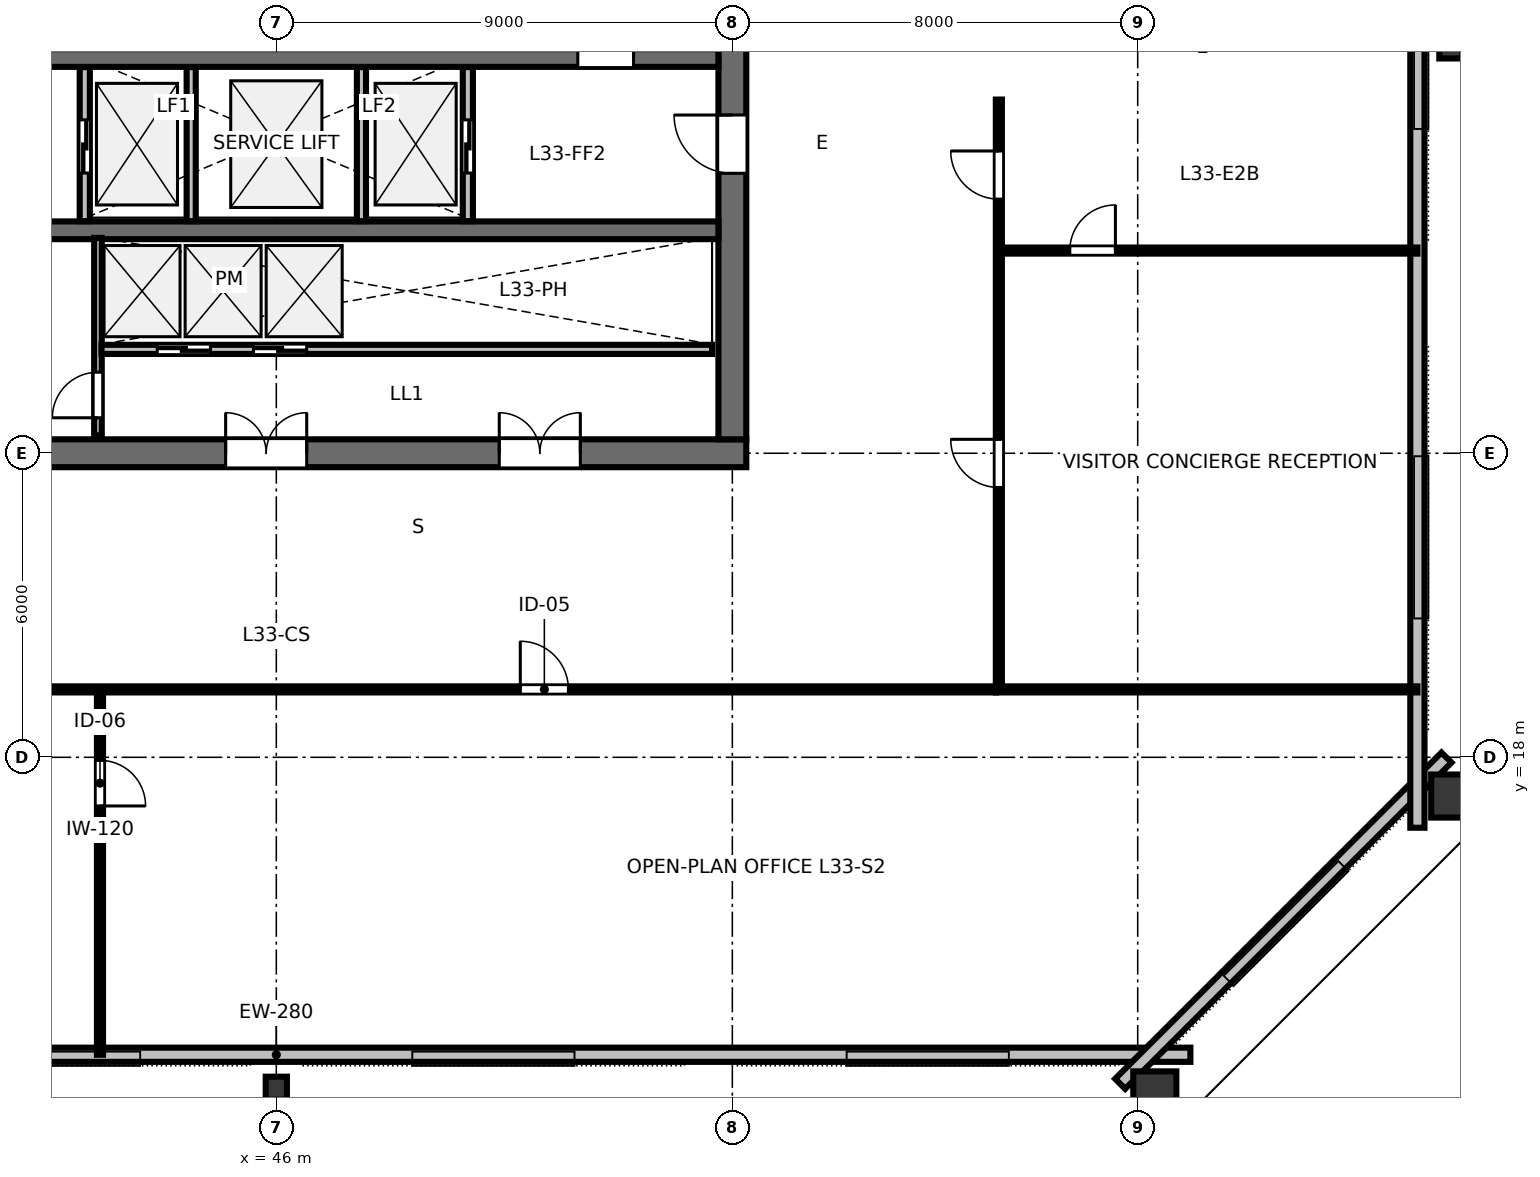
"""IFC4 building model, lengths in metres.
Left out: names, types, materials, properties, quantities, classifications, styles, units other than length and angle.
Written with IfcOpenShell. Run it as: python <this file> out.ifc"""

import sys

from ifc_helpers import new_model, si_unit, direction, frame, frame_2d, origin, origin_2d, place, context, subcontext, project, spatial, rectangle, hollow_rectangle, i_section, extrude, element, fill, save


model = new_model("IFC4")
c1 = context("Model", 3, precision=1e-05, world=origin(), true_north=direction((0.0, 1.0)))
c2 = subcontext(c1, "Body", "Model", "MODEL_VIEW")
j1 = project(units=[si_unit("LENGTHUNIT", "METRE"), si_unit("PLANEANGLEUNIT", "RADIAN")], contexts=[c1])
p1 = place(None, origin())
s1 = spatial("IfcSite", under=j1, at=p1, CompositionType="ELEMENT")
p2 = place(p1, origin())
s2 = spatial("IfcBuilding", under=s1, at=p2, CompositionType="ELEMENT")
p3 = place(p2, frame((0.0, 0.0, 127.6)))
s3 = spatial("IfcBuildingStorey", under=s2, at=p3, CompositionType="ELEMENT", Elevation=127.6)
p4 = place(p3, frame((36.725, 24.0, 0.0), z_axis=(0.0, 0.0, 1.0), x_axis=(1.0, 0.0, 0.0)))
e1 = element("IfcWall", 1, at=p4, inside=s3, PredefinedType="SHEAR", context=c2, shape_type="SweptSolid", body=[
    extrude(rectangle(XDim=18.55, YDim=0.55, at=frame_2d((9.275, 0.0))), origin(), (0.0, 0.0, 1.0), 3.36),
])
p5 = place(p4, frame((8.275, 0.0, 0.0)))
e2 = element("IfcOpeningElement", 2, at=p5, cuts=e1, PredefinedType="OPENING", context=c2, shape_type="SweptSolid", body=[
    extrude(rectangle(XDim=1.6, YDim=2.15, at=frame_2d((0.8, 1.075))), frame((0.0, 0.285, 0.0), z_axis=(0.0, -1.0, 0.0), x_axis=(1.0, 0.0, 0.0)), (0.0, 0.0, 1.0), 0.57),
])
p6 = place(p4, frame((13.675, 0.0, 0.0)))
e3 = element("IfcOpeningElement", 3, at=p6, cuts=e1, PredefinedType="OPENING", context=c2, shape_type="SweptSolid", body=[
    extrude(rectangle(XDim=1.6, YDim=2.15, at=frame_2d((0.8, 1.075))), frame((0.0, 0.285, 0.0), z_axis=(0.0, -1.0, 0.0), x_axis=(1.0, 0.0, 0.0)), (0.0, 0.0, 1.0), 0.57),
])
p7 = place(p3, frame((55.0, 24.275, 0.0), z_axis=(0.0, 0.0, 1.0), x_axis=(0.0, 1.0, 0.0)))
e4 = element("IfcWall", 4, at=p7, inside=s3, PredefinedType="SHEAR", context=c2, shape_type="SweptSolid", body=[
    extrude(rectangle(XDim=15.45, YDim=0.55, at=frame_2d((7.725, 0.0))), origin(), (0.0, 0.0, 1.0), 3.36),
])
p8 = place(p7, frame((5.25, 0.0, 0.0)))
e5 = element("IfcOpeningElement", 5, at=p8, cuts=e4, PredefinedType="OPENING", context=c2, shape_type="SweptSolid", body=[
    extrude(rectangle(XDim=1.15, YDim=2.15, at=frame_2d((0.575, 1.075))), frame((0.0, 0.285, 0.0), z_axis=(0.0, -1.0, 0.0), x_axis=(1.0, 0.0, 0.0)), (0.0, 0.0, 1.0), 0.57),
])
p9 = place(p3, frame((37.275, 31.8, 0.0), z_axis=(0.0, 0.0, 1.0), x_axis=(1.0, 0.0, 0.0)))
e6 = element("IfcWall", 6, at=p9, inside=s3, PredefinedType="SHEAR", context=c2, shape_type="SweptSolid", body=[
    extrude(rectangle(XDim=17.45, YDim=0.35, at=frame_2d((8.725, 0.0))), origin(), (0.0, 0.0, 1.0), 3.36),
])
p10 = place(p9, frame((0.775, 0.0, 0.0)))
e7 = element("IfcOpeningElement", 7, at=p10, cuts=e6, PredefinedType="OPENING", context=c2, shape_type="SweptSolid", body=[
    extrude(rectangle(XDim=1.1, YDim=2.15, at=frame_2d((0.55, 1.075))), frame((0.0, 0.185, 0.0), z_axis=(0.0, -1.0, 0.0), x_axis=(1.0, 0.0, 0.0)), (0.0, 0.0, 1.0), 0.37),
])
p11 = place(p9, frame((14.675, 0.0, 0.0)))
e8 = element("IfcOpeningElement", 8, at=p11, cuts=e6, PredefinedType="OPENING", context=c2, shape_type="SweptSolid", body=[
    extrude(rectangle(XDim=1.1, YDim=2.15, at=frame_2d((0.55, 1.075))), frame((0.0, 0.185, 0.0), z_axis=(0.0, -1.0, 0.0), x_axis=(1.0, 0.0, 0.0)), (0.0, 0.0, 1.0), 0.37),
])
p12 = place(p3, frame((37.275, 28.4, 0.0), z_axis=(0.0, 0.0, 1.0), x_axis=(1.0, 0.0, 0.0)))
e9 = element("IfcWall", 9, at=p12, inside=s3, PredefinedType="SHEAR", context=c2, shape_type="SweptSolid", body=[
    extrude(rectangle(XDim=17.45, YDim=0.35, at=frame_2d((8.725, 0.0))), origin(), (0.0, 0.0, 1.0), 3.36),
])
p13 = place(p3, frame((46.0, 11.47, 0.0), z_axis=(0.0, 0.0, 1.0), x_axis=(1.0, 0.0, 0.0)))
e10 = element("IfcColumn", 10, at=p13, inside=s3, PredefinedType="COLUMN", context=c2, shape_type="SweptSolid", body=[
    extrude(i_section(OverallWidth=0.418, OverallDepth=0.455, WebThickness=0.042, FlangeThickness=0.068, FilletRadius=0.025, at=origin_2d()), origin(), (0.0, 0.0, 1.0), 3.358),
])
for number, where, z_axis, x_axis in (
    (11, (63.338, 11.302, 0.0), (0.0, 0.0, 1.0), (1.0, 0.0, 0.0)),
    (12, (69.292, 17.236, 0.0), (0.0, 0.0, 1.0), (0.0, 1.0, 0.0)),
):
    element("IfcColumn", number, at=place(p3, frame(where, z_axis=z_axis, x_axis=x_axis)), inside=s3, PredefinedType="COLUMN", context=c2, shape_type="SweptSolid", body=[
        extrude(hollow_rectangle(XDim=0.85, YDim=1.0, WallThickness=0.05, at=origin_2d()), origin(), (0.0, 0.0, 1.0), 3.358),
    ])
p14 = place(p3, frame((69.18, 32.0, 0.0), z_axis=(0.0, 0.0, 1.0), x_axis=(0.0, 1.0, 0.0)))
e13 = element("IfcColumn", 13, at=p14, inside=s3, PredefinedType="COLUMN", context=c2, shape_type="SweptSolid", body=[
    extrude(i_section(OverallWidth=0.418, OverallDepth=0.455, WebThickness=0.042, FlangeThickness=0.068, FilletRadius=0.025, at=origin_2d()), origin(), (0.0, 0.0, 1.0), 3.358),
])
p15 = place(p3, frame((27.96, 12.13, 0.0), z_axis=(0.0, 0.0, 1.0), x_axis=(1.0, 0.0, 0.0)))
e14 = element("IfcWall", 14, at=p15, inside=s3, PredefinedType="STANDARD", context=c2, shape_type="SweptSolid", body=[
    extrude(rectangle(XDim=36.08, YDim=0.28, at=frame_2d((18.04, 0.0))), origin(), (0.0, 0.0, 1.0), 3.36),
])
p16 = place(p3, frame((62.655, 11.556, 0.0), z_axis=(0.0, 0.0, 1.0), x_axis=(0.707106781187, 0.707106781187, 0.0)))
e15 = element("IfcWall", 15, at=p16, inside=s3, PredefinedType="STANDARD", context=c2, shape_type="SweptSolid", body=[
    extrude(rectangle(XDim=9.107, YDim=0.28, at=frame_2d((4.553, 0.0))), origin(), (0.0, 0.0, 1.0), 3.36),
])
p17 = place(p3, frame((68.52, 16.61, 0.0), z_axis=(0.0, 0.0, 1.0), x_axis=(0.0, 1.0, 0.0)))
e16 = element("IfcWall", 16, at=p17, inside=s3, PredefinedType="STANDARD", context=c2, shape_type="SweptSolid", body=[
    extrude(rectangle(XDim=30.78, YDim=0.28, at=frame_2d((15.39, 0.0))), origin(), (0.0, 0.0, 1.0), 3.36),
])
p18 = place(p3, frame((42.22, 28.58, 0.0), z_axis=(0.0, 0.0, 1.0), x_axis=(0.0, 1.0, 0.0)))
e17 = element("IfcWall", 17, at=p18, inside=s3, PredefinedType="PARTITIONING", context=c2, shape_type="SweptSolid", body=[
    extrude(rectangle(XDim=3.04, YDim=0.2, at=frame_2d((1.52, 0.0))), origin(), (0.0, 0.0, 1.0), 3.36),
])
p19 = place(p18, frame((0.95, 0.0, 0.0)))
e18 = element("IfcOpeningElement", 18, at=p19, cuts=e17, PredefinedType="OPENING", context=c2, shape_type="SweptSolid", body=[
    extrude(rectangle(XDim=1.05, YDim=2.15, at=frame_2d((0.525, 1.075))), frame((0.0, 0.11, 0.0), z_axis=(0.0, -1.0, 0.0), x_axis=(1.0, 0.0, 0.0)), (0.0, 0.0, 1.0), 0.22),
])
p20 = place(p3, frame((49.78, 28.58, 0.0), z_axis=(0.0, 0.0, 1.0), x_axis=(0.0, 1.0, 0.0)))
e19 = element("IfcWall", 19, at=p20, inside=s3, PredefinedType="PARTITIONING", context=c2, shape_type="SweptSolid", body=[
    extrude(rectangle(XDim=3.04, YDim=0.2, at=frame_2d((1.52, 0.0))), origin(), (0.0, 0.0, 1.0), 3.36),
])
p21 = place(p20, frame((0.95, 0.0, 0.0)))
e20 = element("IfcOpeningElement", 20, at=p21, cuts=e19, PredefinedType="OPENING", context=c2, shape_type="SweptSolid", body=[
    extrude(rectangle(XDim=1.05, YDim=2.15, at=frame_2d((0.525, 1.075))), frame((0.0, 0.11, 0.0), z_axis=(0.0, -1.0, 0.0), x_axis=(1.0, 0.0, 0.0)), (0.0, 0.0, 1.0), 0.22),
])
for number, where, z_axis, x_axis in (
    (21, (44.32, 28.58, 0.0), (0.0, 0.0, 1.0), (0.0, 1.0, 0.0)),
    (22, (47.68, 28.58, 0.0), (0.0, 0.0, 1.0), (0.0, 1.0, 0.0)),
):
    element("IfcWall", number, at=place(p3, frame(where, z_axis=z_axis, x_axis=x_axis)), inside=s3, PredefinedType="PARTITIONING", context=c2, shape_type="SweptSolid", body=[
        extrude(rectangle(XDim=3.04, YDim=0.18, at=frame_2d((1.52, 0.0))), origin(), (0.0, 0.0, 1.0), 3.36),
    ])
p22 = place(p3, frame((42.48, 24.35, 0.0), z_axis=(0.0, 0.0, 1.0), x_axis=(0.0, 1.0, 0.0)))
e23 = element("IfcWall", 23, at=p22, inside=s3, PredefinedType="PARTITIONING", context=c2, shape_type="SweptSolid", body=[
    extrude(rectangle(XDim=3.9, YDim=0.15, at=frame_2d((1.95, 0.0))), origin(), (0.0, 0.0, 1.0), 3.36),
])
p23 = place(p22, frame((0.35, 0.0, 0.0)))
e24 = element("IfcOpeningElement", 24, at=p23, cuts=e23, PredefinedType="OPENING", context=c2, shape_type="SweptSolid", body=[
    extrude(rectangle(XDim=0.9, YDim=2.15, at=frame_2d((0.45, 1.075))), frame((0.0, 0.085, 0.0), z_axis=(0.0, -1.0, 0.0), x_axis=(1.0, 0.0, 0.0)), (0.0, 0.0, 1.0), 0.17),
])
p24 = place(p3, frame((42.55, 26.05, 0.0), z_axis=(0.0, 0.0, 1.0), x_axis=(1.0, 0.0, 0.0)))
e25 = element("IfcWall", 25, at=p24, inside=s3, PredefinedType="PARTITIONING", context=c2, shape_type="SweptSolid", body=[
    extrude(rectangle(XDim=12.05, YDim=0.18, at=frame_2d((6.025, 0.0))), origin(), (0.0, 0.0, 1.0), 3.36),
])
p25 = place(p24, frame((1.1, 0.0, 0.0)))
e26 = element("IfcOpeningElement", 26, at=p25, cuts=e25, PredefinedType="OPENING", context=c2, shape_type="SweptSolid", body=[
    extrude(rectangle(XDim=1.05, YDim=2.15, at=frame_2d((0.525, 1.075))), frame((0.0, 0.1, 0.0), z_axis=(0.0, -1.0, 0.0), x_axis=(1.0, 0.0, 0.0)), (0.0, 0.0, 1.0), 0.2),
])
p26 = place(p24, frame((3.0, 0.0, 0.0)))
e27 = element("IfcOpeningElement", 27, at=p26, cuts=e25, PredefinedType="OPENING", context=c2, shape_type="SweptSolid", body=[
    extrude(rectangle(XDim=1.05, YDim=2.15, at=frame_2d((0.525, 1.075))), frame((0.0, 0.1, 0.0), z_axis=(0.0, -1.0, 0.0), x_axis=(1.0, 0.0, 0.0)), (0.0, 0.0, 1.0), 0.2),
])
p27 = place(p3, frame((42.52, 19.34, 0.0), z_axis=(0.0, 0.0, 1.0), x_axis=(0.0, -1.0, 0.0)))
e28 = element("IfcWall", 28, at=p27, inside=s3, PredefinedType="PARTITIONING", context=c2, shape_type="SweptSolid", body=[
    extrude(rectangle(XDim=7.21, YDim=0.12, at=frame_2d((3.605, 0.0))), origin(), (0.0, 0.0, 1.0), 2.64),
])
p28 = place(p27, frame((1.4, 0.0, 0.0)))
e29 = element("IfcOpeningElement", 29, at=p28, cuts=e28, PredefinedType="OPENING", context=c2, shape_type="SweptSolid", body=[
    extrude(rectangle(XDim=0.9, YDim=2.15, at=frame_2d((0.45, 1.075))), frame((0.0, 0.07, 0.0), z_axis=(0.0, -1.0, 0.0), x_axis=(1.0, 0.0, 0.0)), (0.0, 0.0, 1.0), 0.14),
])
p29 = place(p3, frame((31.8, 19.34, 0.0), z_axis=(0.0, 0.0, 1.0), x_axis=(1.0, 0.0, 0.0)))
e30 = element("IfcWall", 30, at=p29, inside=s3, PredefinedType="PARTITIONING", context=c2, shape_type="SweptSolid", body=[
    extrude(rectangle(XDim=28.4, YDim=0.12, at=frame_2d((14.2, 0.0))), origin(), (0.0, 0.0, 1.0), 2.64),
])
p30 = place(p29, frame((4.955, 0.0, 0.0)))
e31 = element("IfcOpeningElement", 31, at=p30, cuts=e30, PredefinedType="OPENING", context=c2, shape_type="SweptSolid", body=[
    extrude(rectangle(XDim=0.95, YDim=2.15, at=frame_2d((0.475, 1.075))), frame((0.0, 0.07, 0.0), z_axis=(0.0, -1.0, 0.0), x_axis=(1.0, 0.0, 0.0)), (0.0, 0.0, 1.0), 0.14),
])
p31 = place(p29, frame((19.015, 0.0, 0.0)))
e32 = element("IfcOpeningElement", 32, at=p31, cuts=e30, PredefinedType="OPENING", context=c2, shape_type="SweptSolid", body=[
    extrude(rectangle(XDim=0.95, YDim=2.15, at=frame_2d((0.475, 1.075))), frame((0.0, 0.07, 0.0), z_axis=(0.0, -1.0, 0.0), x_axis=(1.0, 0.0, 0.0)), (0.0, 0.0, 1.0), 0.14),
])
p32 = place(p3, frame((60.26, 28.0, 0.0), z_axis=(0.0, 0.0, 1.0), x_axis=(1.0, 0.0, 0.0)))
e33 = element("IfcWall", 33, at=p32, inside=s3, PredefinedType="PARTITIONING", context=c2, shape_type="SweptSolid", body=[
    extrude(rectangle(XDim=8.26, YDim=0.12, at=frame_2d((4.13, 0.0))), origin(), (0.0, 0.0, 1.0), 2.64),
])
p33 = place(p32, frame((1.4, 0.0, 0.0)))
e34 = element("IfcOpeningElement", 34, at=p33, cuts=e33, PredefinedType="OPENING", context=c2, shape_type="SweptSolid", body=[
    extrude(rectangle(XDim=0.9, YDim=2.15, at=frame_2d((0.45, 1.075))), frame((0.0, 0.07, 0.0), z_axis=(0.0, -1.0, 0.0), x_axis=(1.0, 0.0, 0.0)), (0.0, 0.0, 1.0), 0.14),
])
p34 = place(p3, frame((60.26, 19.4, 0.0), z_axis=(0.0, 0.0, 1.0), x_axis=(0.0, 1.0, 0.0)))
e35 = element("IfcWall", 35, at=p34, inside=s3, PredefinedType="PARTITIONING", context=c2, shape_type="SweptSolid", body=[
    extrude(rectangle(XDim=11.58, YDim=0.12, at=frame_2d((5.79, 0.0))), origin(), (0.0, 0.0, 1.0), 2.64),
])
p35 = place(p34, frame((3.925, 0.0, 0.0)))
e36 = element("IfcOpeningElement", 36, at=p35, cuts=e35, PredefinedType="OPENING", context=c2, shape_type="SweptSolid", body=[
    extrude(rectangle(XDim=0.95, YDim=2.15, at=frame_2d((0.475, 1.075))), frame((0.0, 0.07, 0.0), z_axis=(0.0, -1.0, 0.0), x_axis=(1.0, 0.0, 0.0)), (0.0, 0.0, 1.0), 0.14),
])
p36 = place(p34, frame((9.615, 0.0, 0.0)))
e37 = element("IfcOpeningElement", 37, at=p36, cuts=e35, PredefinedType="OPENING", context=c2, shape_type="SweptSolid", body=[
    extrude(rectangle(XDim=0.95, YDim=2.15, at=frame_2d((0.475, 1.075))), frame((0.0, 0.07, 0.0), z_axis=(0.0, -1.0, 0.0), x_axis=(1.0, 0.0, 0.0)), (0.0, 0.0, 1.0), 0.14),
])
p37 = place(p3, frame((60.2, 19.34, 0.0), z_axis=(0.0, 0.0, 1.0), x_axis=(1.0, 0.0, 0.0)))
e38 = element("IfcWall", 38, at=p37, inside=s3, PredefinedType="PARTITIONING", context=c2, shape_type="SweptSolid", body=[
    extrude(rectangle(XDim=8.32, YDim=0.12, at=frame_2d((4.16, 0.0))), origin(), (0.0, 0.0, 1.0), 2.64),
])
p38 = place(p11, origin())
e39 = element("IfcDoor", 39, at=p38, inside=s3, OperationType="SINGLE_SWING_RIGHT", PredefinedType="DOOR", context=c2, shape_type="SweptSolid", body=[
    extrude(rectangle(XDim=1.1, YDim=2.15, at=frame_2d((0.55, 1.075))), frame((0.0, 0.025, 0.0), z_axis=(0.0, -1.0, 0.0), x_axis=(1.0, 0.0, 0.0)), (0.0, 0.0, 1.0), 0.05),
])
fill(e8, e39)
p39 = place(p8, origin())
e40 = element("IfcDoor", 40, at=p39, inside=s3, OperationType="SINGLE_SWING_RIGHT", PredefinedType="DOOR", context=c2, shape_type="SweptSolid", body=[
    extrude(rectangle(XDim=1.15, YDim=2.15, at=frame_2d((0.575, 1.075))), frame((0.0, 0.025, 0.0), z_axis=(0.0, -1.0, 0.0), x_axis=(1.0, 0.0, 0.0)), (0.0, 0.0, 1.0), 0.05),
])
fill(e5, e40)
p40 = place(p5, origin())
e41 = element("IfcDoor", 41, at=p40, inside=s3, OperationType="DOUBLE_DOOR_SINGLE_SWING", PredefinedType="DOOR", context=c2, shape_type="SweptSolid", body=[
    extrude(rectangle(XDim=1.6, YDim=2.15, at=frame_2d((0.8, 1.075))), frame((0.0, 0.025, 0.0), z_axis=(0.0, -1.0, 0.0), x_axis=(1.0, 0.0, 0.0)), (0.0, 0.0, 1.0), 0.05),
])
fill(e2, e41)
p41 = place(p6, origin())
e42 = element("IfcDoor", 42, at=p41, inside=s3, OperationType="DOUBLE_DOOR_SINGLE_SWING", PredefinedType="DOOR", context=c2, shape_type="SweptSolid", body=[
    extrude(rectangle(XDim=1.6, YDim=2.15, at=frame_2d((0.8, 1.075))), frame((0.0, 0.025, 0.0), z_axis=(0.0, -1.0, 0.0), x_axis=(1.0, 0.0, 0.0)), (0.0, 0.0, 1.0), 0.05),
])
fill(e3, e42)
p42 = place(p19, origin())
e43 = element("IfcDoor", 43, at=p42, inside=s3, OperationType="SLIDING_TO_LEFT", PredefinedType="DOOR", context=c2, shape_type="SweptSolid", body=[
    extrude(rectangle(XDim=1.05, YDim=2.15, at=frame_2d((0.525, 1.075))), frame((0.0, 0.025, 0.0), z_axis=(0.0, -1.0, 0.0), x_axis=(1.0, 0.0, 0.0)), (0.0, 0.0, 1.0), 0.05),
])
fill(e18, e43)
p43 = place(p21, origin())
e44 = element("IfcDoor", 44, at=p43, inside=s3, OperationType="SLIDING_TO_RIGHT", PredefinedType="DOOR", context=c2, shape_type="SweptSolid", body=[
    extrude(rectangle(XDim=1.05, YDim=2.15, at=frame_2d((0.525, 1.075))), frame((0.0, 0.025, 0.0), z_axis=(0.0, -1.0, 0.0), x_axis=(1.0, 0.0, 0.0)), (0.0, 0.0, 1.0), 0.05),
])
fill(e20, e44)
p44 = place(p23, origin())
e45 = element("IfcDoor", 45, at=p44, inside=s3, OperationType="SINGLE_SWING_LEFT", PredefinedType="DOOR", context=c2, shape_type="SweptSolid", body=[
    extrude(rectangle(XDim=0.9, YDim=2.15, at=frame_2d((0.45, 1.075))), frame((0.0, 0.025, 0.0), z_axis=(0.0, -1.0, 0.0), x_axis=(1.0, 0.0, 0.0)), (0.0, 0.0, 1.0), 0.05),
])
fill(e24, e45)
p45 = place(p25, origin())
e46 = element("IfcDoor", 46, at=p45, inside=s3, OperationType="SLIDING_TO_LEFT", PredefinedType="DOOR", context=c2, shape_type="SweptSolid", body=[
    extrude(rectangle(XDim=1.05, YDim=2.15, at=frame_2d((0.525, 1.075))), frame((0.0, 0.025, 0.0), z_axis=(0.0, -1.0, 0.0), x_axis=(1.0, 0.0, 0.0)), (0.0, 0.0, 1.0), 0.05),
])
fill(e26, e46)
p46 = place(p26, origin())
e47 = element("IfcDoor", 47, at=p46, inside=s3, OperationType="SLIDING_TO_RIGHT", PredefinedType="DOOR", context=c2, shape_type="SweptSolid", body=[
    extrude(rectangle(XDim=1.05, YDim=2.15, at=frame_2d((0.525, 1.075))), frame((0.0, 0.025, 0.0), z_axis=(0.0, -1.0, 0.0), x_axis=(1.0, 0.0, 0.0)), (0.0, 0.0, 1.0), 0.05),
])
fill(e27, e47)
p47 = place(p28, origin())
e48 = element("IfcDoor", 48, at=p47, inside=s3, OperationType="SINGLE_SWING_RIGHT", PredefinedType="DOOR", context=c2, shape_type="SweptSolid", body=[
    extrude(rectangle(XDim=0.9, YDim=2.15, at=frame_2d((0.45, 1.075))), frame((0.0, 0.025, 0.0), z_axis=(0.0, -1.0, 0.0), x_axis=(1.0, 0.0, 0.0)), (0.0, 0.0, 1.0), 0.05),
])
fill(e29, e48)
p48 = place(p31, origin())
e49 = element("IfcDoor", 49, at=p48, inside=s3, OperationType="SINGLE_SWING_LEFT", PredefinedType="DOOR", context=c2, shape_type="SweptSolid", body=[
    extrude(rectangle(XDim=0.95, YDim=2.15, at=frame_2d((0.475, 1.075))), frame((0.0, 0.025, 0.0), z_axis=(0.0, -1.0, 0.0), x_axis=(1.0, 0.0, 0.0)), (0.0, 0.0, 1.0), 0.05),
])
fill(e32, e49)
p49 = place(p33, origin())
e50 = element("IfcDoor", 50, at=p49, inside=s3, OperationType="SINGLE_SWING_RIGHT", PredefinedType="DOOR", context=c2, shape_type="SweptSolid", body=[
    extrude(rectangle(XDim=0.9, YDim=2.15, at=frame_2d((0.45, 1.075))), frame((0.0, 0.025, 0.0), z_axis=(0.0, -1.0, 0.0), x_axis=(1.0, 0.0, 0.0)), (0.0, 0.0, 1.0), 0.05),
])
fill(e34, e50)
p50 = place(p35, origin())
e51 = element("IfcDoor", 51, at=p50, inside=s3, OperationType="SINGLE_SWING_RIGHT", PredefinedType="DOOR", context=c2, shape_type="SweptSolid", body=[
    extrude(rectangle(XDim=0.95, YDim=2.15, at=frame_2d((0.475, 1.075))), frame((0.0, 0.025, 0.0), z_axis=(0.0, -1.0, 0.0), x_axis=(1.0, 0.0, 0.0)), (0.0, 0.0, 1.0), 0.05),
])
fill(e36, e51)
p51 = place(p36, origin())
e52 = element("IfcDoor", 52, at=p51, inside=s3, OperationType="SINGLE_SWING_RIGHT", PredefinedType="DOOR", context=c2, shape_type="SweptSolid", body=[
    extrude(rectangle(XDim=0.95, YDim=2.15, at=frame_2d((0.475, 1.075))), frame((0.0, 0.025, 0.0), z_axis=(0.0, -1.0, 0.0), x_axis=(1.0, 0.0, 0.0)), (0.0, 0.0, 1.0), 0.05),
])
fill(e37, e52)
save(model, sys.argv[1])
